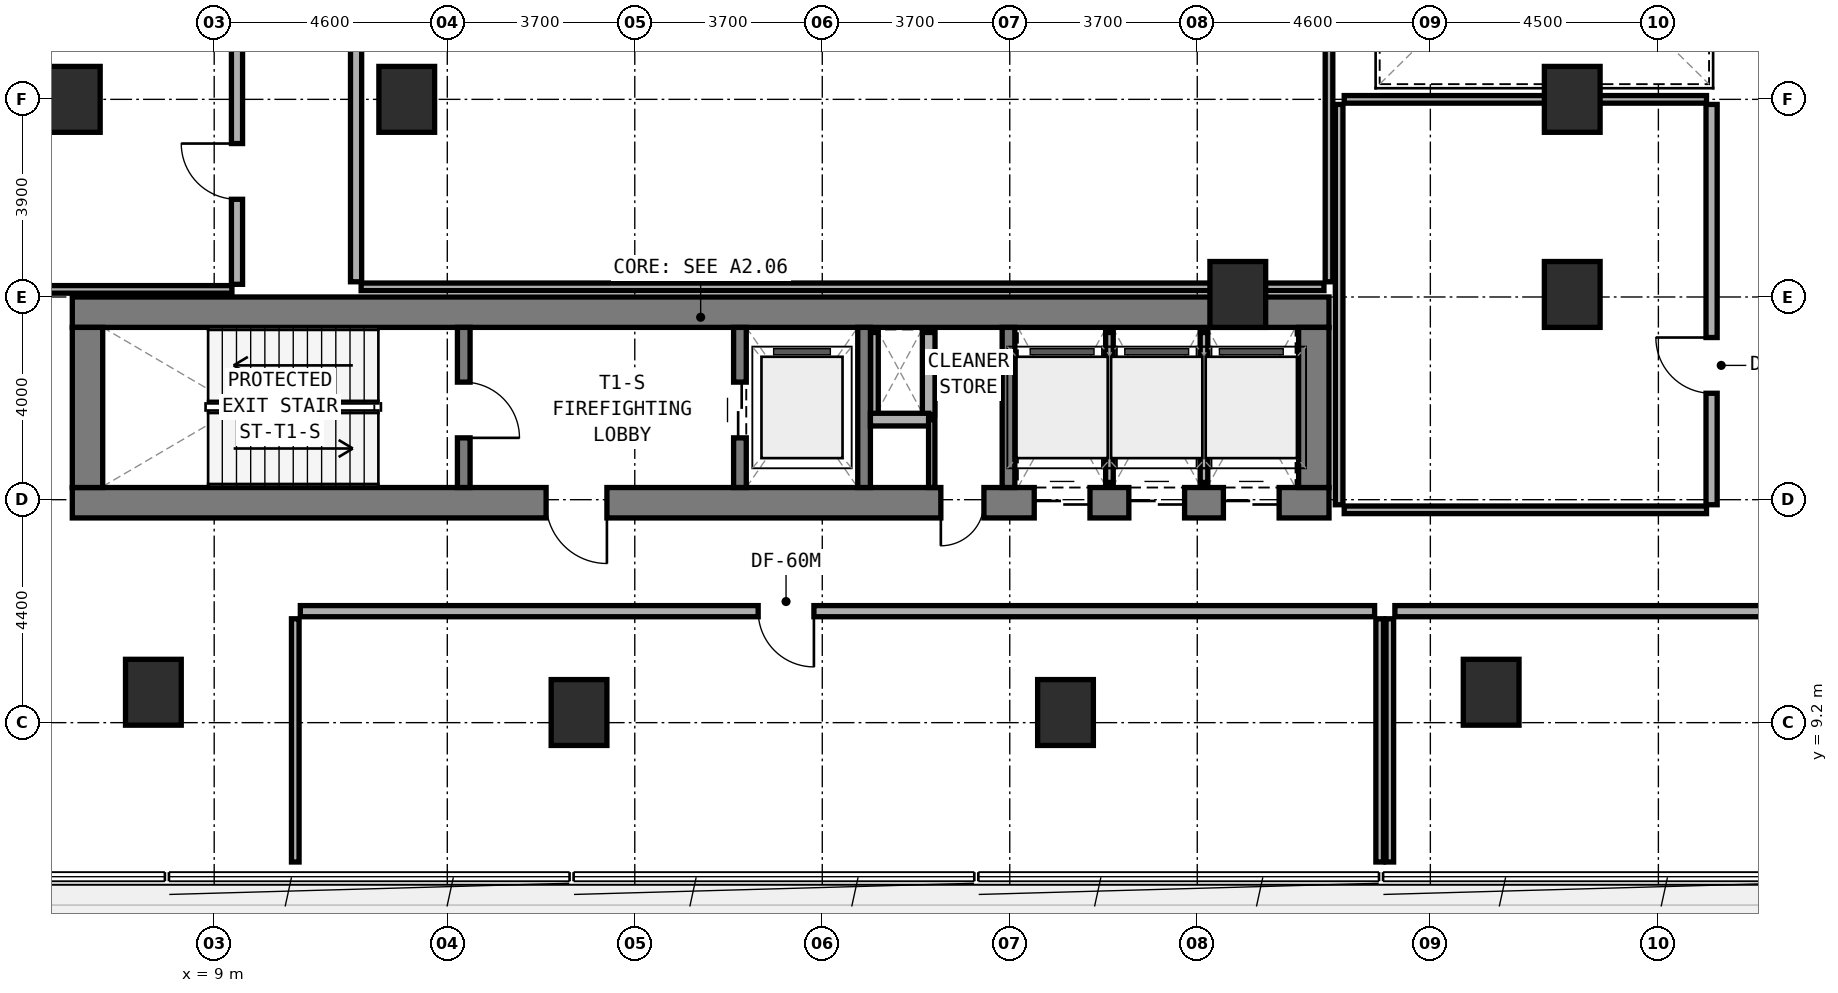
"""IFC4 building model, lengths in metres.
Left out: names, types, materials, properties, quantities, classifications, styles, units other than length and angle.
Written with IfcOpenShell. Run it as: python <this file> out.ifc"""

import sys

from ifc_helpers import new_model, si_unit, direction, frame, frame_2d, origin, origin_2d, place, context, subcontext, project, spatial, rectangle, extrude, element, fill, save


model = new_model("IFC4")
c1 = context("Model", 3, precision=1e-05, world=origin(), true_north=direction((0.0, 1.0)))
c2 = subcontext(c1, "Body", "Model", "MODEL_VIEW")
j1 = project(units=[si_unit("LENGTHUNIT", "METRE"), si_unit("PLANEANGLEUNIT", "RADIAN")], contexts=[c1])
p1 = place(None, origin())
s1 = spatial("IfcSite", under=j1, at=p1, CompositionType="ELEMENT")
p2 = place(p1, origin())
s2 = spatial("IfcBuilding", under=s1, at=p2, CompositionType="ELEMENT")
p3 = place(p2, frame((0.0, 0.0, 15.0)))
s3 = spatial("IfcBuildingStorey", under=s2, at=p3, CompositionType="ELEMENT", Elevation=15.0)
p4 = place(p3, frame((6.2, 13.54, 0.0), z_axis=(0.0, 0.0, 1.0), x_axis=(1.0, 0.0, 0.0)))
e1 = element("IfcWall", 1, at=p4, inside=s3, PredefinedType="SHEAR", context=c2, shape_type="SweptSolid", body=[
    extrude(rectangle(XDim=24.8, YDim=0.6, at=frame_2d((12.4, 0.0))), origin(), (0.0, 0.0, 1.0), 4.5),
])
p5 = place(p4, frame((9.35, 0.0, 0.0)))
e2 = element("IfcOpeningElement", 2, at=p5, cuts=e1, PredefinedType="OPENING", context=c2, shape_type="SweptSolid", body=[
    extrude(rectangle(XDim=1.2, YDim=2.15, at=frame_2d((0.6, 1.075))), frame((0.0, 0.31, 0.0), z_axis=(0.0, -1.0, 0.0), x_axis=(1.0, 0.0, 0.0)), (0.0, 0.0, 1.0), 0.62),
])
p6 = place(p4, frame((17.14, 0.0, 0.0)))
e3 = element("IfcOpeningElement", 3, at=p6, cuts=e1, PredefinedType="OPENING", context=c2, shape_type="SweptSolid", body=[
    extrude(rectangle(XDim=0.85, YDim=2.1, at=frame_2d((0.425, 1.05))), frame((0.0, 0.31, 0.0), z_axis=(0.0, -1.0, 0.0), x_axis=(1.0, 0.0, 0.0)), (0.0, 0.0, 1.0), 0.62),
])
p7 = place(p4, frame((18.983, 0.0, 0.0)))
e4 = element("IfcOpeningElement", 4, at=p7, cuts=e1, PredefinedType="OPENING", context=c2, shape_type="SweptSolid", body=[
    extrude(rectangle(XDim=1.1, YDim=2.15, at=frame_2d((0.55, 1.075))), frame((0.0, 0.31, 0.0), z_axis=(0.0, -1.0, 0.0), x_axis=(1.0, 0.0, 0.0)), (0.0, 0.0, 1.0), 0.62),
])
p8 = place(p4, frame((20.85, 0.0, 0.0)))
e5 = element("IfcOpeningElement", 5, at=p8, cuts=e1, PredefinedType="OPENING", context=c2, shape_type="SweptSolid", body=[
    extrude(rectangle(XDim=1.1, YDim=2.15, at=frame_2d((0.55, 1.075))), frame((0.0, 0.31, 0.0), z_axis=(0.0, -1.0, 0.0), x_axis=(1.0, 0.0, 0.0)), (0.0, 0.0, 1.0), 0.62),
])
p9 = place(p4, frame((22.716, 0.0, 0.0)))
e6 = element("IfcOpeningElement", 6, at=p9, cuts=e1, PredefinedType="OPENING", context=c2, shape_type="SweptSolid", body=[
    extrude(rectangle(XDim=1.1, YDim=2.15, at=frame_2d((0.55, 1.075))), frame((0.0, 0.31, 0.0), z_axis=(0.0, -1.0, 0.0), x_axis=(1.0, 0.0, 0.0)), (0.0, 0.0, 1.0), 0.62),
])
p10 = place(p3, frame((6.2, 17.3, 0.0), z_axis=(0.0, 0.0, 1.0), x_axis=(1.0, 0.0, 0.0)))
e7 = element("IfcWall", 7, at=p10, inside=s3, PredefinedType="SHEAR", context=c2, shape_type="SweptSolid", body=[
    extrude(rectangle(XDim=24.8, YDim=0.6, at=frame_2d((12.4, 0.0))), origin(), (0.0, 0.0, 1.0), 4.5),
])
for number, where, z_axis, x_axis in (
    (8, (6.5, 13.84, 0.0), (0.0, 0.0, 1.0), (0.0, 1.0, 0.0)),
    (9, (30.7, 13.84, 0.0), (0.0, 0.0, 1.0), (0.0, 1.0, 0.0)),
):
    element("IfcWall", number, at=place(p3, frame(where, z_axis=z_axis, x_axis=x_axis)), inside=s3, PredefinedType="SHEAR", context=c2, shape_type="SweptSolid", body=[
        extrude(rectangle(XDim=3.16, YDim=0.6, at=frame_2d((1.58, 0.0))), origin(), (0.0, 0.0, 1.0), 4.5),
    ])
p11 = place(p3, frame((13.925, 13.84, 0.0), z_axis=(0.0, 0.0, 1.0), x_axis=(0.0, 1.0, 0.0)))
e10 = element("IfcWall", 10, at=p11, inside=s3, PredefinedType="STANDARD", context=c2, shape_type="SweptSolid", body=[
    extrude(rectangle(XDim=3.16, YDim=0.25, at=frame_2d((1.58, 0.0))), origin(), (0.0, 0.0, 1.0), 4.1),
])
p12 = place(p11, frame((0.98, 0.0, 0.0)))
e11 = element("IfcOpeningElement", 11, at=p12, cuts=e10, PredefinedType="OPENING", context=c2, shape_type="SweptSolid", body=[
    extrude(rectangle(XDim=1.1, YDim=2.15, at=frame_2d((0.55, 1.075))), frame((0.0, 0.135, 0.0), z_axis=(0.0, -1.0, 0.0), x_axis=(1.0, 0.0, 0.0)), (0.0, 0.0, 1.0), 0.27),
])
p13 = place(p3, frame((19.375, 13.84, 0.0), z_axis=(0.0, 0.0, 1.0), x_axis=(0.0, 1.0, 0.0)))
e12 = element("IfcWall", 12, at=p13, inside=s3, PredefinedType="STANDARD", context=c2, shape_type="SweptSolid", body=[
    extrude(rectangle(XDim=3.16, YDim=0.25, at=frame_2d((1.58, 0.0))), origin(), (0.0, 0.0, 1.0), 4.1),
])
p14 = place(p13, frame((0.98, 0.0, 0.0)))
e13 = element("IfcOpeningElement", 13, at=p14, cuts=e12, PredefinedType="OPENING", context=c2, shape_type="SweptSolid", body=[
    extrude(rectangle(XDim=1.1, YDim=2.15, at=frame_2d((0.55, 1.075))), frame((0.0, 0.135, 0.0), z_axis=(0.0, -1.0, 0.0), x_axis=(1.0, 0.0, 0.0)), (0.0, 0.0, 1.0), 0.27),
])
for number, where, z_axis, x_axis in (
    (14, (21.825, 13.84, 0.0), (0.0, 0.0, 1.0), (0.0, 1.0, 0.0)),
    (15, (24.675, 13.84, 0.0), (0.0, 0.0, 1.0), (0.0, 1.0, 0.0)),
):
    element("IfcWall", number, at=place(p3, frame(where, z_axis=z_axis, x_axis=x_axis)), inside=s3, PredefinedType="STANDARD", context=c2, shape_type="SweptSolid", body=[
        extrude(rectangle(XDim=3.16, YDim=0.25, at=frame_2d((1.58, 0.0))), origin(), (0.0, 0.0, 1.0), 4.1),
    ])
for number, where, z_axis, x_axis in (
    (16, (16.2, 9.4, 0.0), (0.0, 0.0, 1.0), (1.0, 0.0, 0.0)),
    (17, (25.8, 9.4, 0.0), (0.0, 0.0, 1.0), (1.0, 0.0, 0.0)),
    (18, (6.2, 21.5, 0.0), (0.0, 0.0, 1.0), (1.0, 0.0, 0.0)),
    (19, (7.8, 9.8, 0.0), (0.0, 0.0, 1.0), (1.0, 0.0, 0.0)),
    (20, (34.2, 9.8, 0.0), (0.0, 0.0, 1.0), (1.0, 0.0, 0.0)),
    (21, (35.8, 21.5, 0.0), (0.0, 0.0, 1.0), (1.0, 0.0, 0.0)),
    (22, (35.8, 17.65, 0.0), (0.0, 0.0, 1.0), (1.0, 0.0, 0.0)),
    (23, (12.8, 21.5, 0.0), (0.0, 0.0, 1.0), (1.0, 0.0, 0.0)),
    (24, (29.2, 17.65, 0.0), (0.0, 0.0, 1.0), (1.0, 0.0, 0.0)),
):
    element("IfcColumn", number, at=place(p3, frame(where, z_axis=z_axis, x_axis=x_axis)), inside=s3, PredefinedType="COLUMN", context=c2, shape_type="SweptSolid", body=[
        extrude(rectangle(XDim=1.1, YDim=1.3, at=origin_2d()), origin(), (0.0, 0.0, 1.0), 4.5),
    ])
p15 = place(p3, frame((22.03, 15.28, 0.0), z_axis=(0.0, 0.0, 1.0), x_axis=(0.0, 1.0, 0.0)))
e25 = element("IfcWall", 25, at=p15, inside=s3, PredefinedType="PARTITIONING", context=c2, shape_type="SweptSolid", body=[
    extrude(rectangle(XDim=1.62, YDim=0.15, at=frame_2d((0.81, 0.0))), origin(), (0.0, 0.0, 1.0), 4.1),
])
p16 = place(p3, frame((23.1, 15.28, 0.0), z_axis=(0.0, 0.0, 1.0), x_axis=(0.0, 1.0, 0.0)))
e26 = element("IfcWall", 26, at=p16, inside=s3, PredefinedType="SOLIDWALL", context=c2, shape_type="SweptSolid", body=[
    extrude(rectangle(XDim=1.62, YDim=0.25, at=frame_2d((0.81, 0.0))), origin(), (0.0, 0.0, 1.0), 4.1),
])
p17 = place(p3, frame((21.95, 15.18, 0.0), z_axis=(0.0, 0.0, 1.0), x_axis=(1.0, 0.0, 0.0)))
e27 = element("IfcWall", 27, at=p17, inside=s3, PredefinedType="SOLIDWALL", context=c2, shape_type="SweptSolid", body=[
    extrude(rectangle(XDim=1.15, YDim=0.25, at=frame_2d((0.575, 0.0))), origin(), (0.0, 0.0, 1.0), 4.1),
])
p18 = place(p3, frame((23.16, 13.84, 0.0), z_axis=(0.0, 0.0, 1.0), x_axis=(0.0, 1.0, 0.0)))
e28 = element("IfcWall", 28, at=p18, inside=s3, PredefinedType="PARTITIONING", context=c2, shape_type="SweptSolid", body=[
    extrude(rectangle(XDim=1.34, YDim=0.125, at=frame_2d((0.67, 0.0))), origin(), (0.0, 0.0, 1.0), 4.1),
])
p19 = place(p3, frame((26.667, 13.94, 0.0), z_axis=(0.0, 0.0, 1.0), x_axis=(0.0, 1.0, 0.0)))
e29 = element("IfcWall", 29, at=p19, inside=s3, PredefinedType="PARTITIONING", context=c2, shape_type="SweptSolid", body=[
    extrude(rectangle(XDim=2.96, YDim=0.15, at=frame_2d((1.48, 0.0))), origin(), (0.0, 0.0, 1.0), 4.1),
])
p20 = place(p3, frame((28.533, 13.94, 0.0), z_axis=(0.0, 0.0, 1.0), x_axis=(0.0, 1.0, 0.0)))
e30 = element("IfcWall", 30, at=p20, inside=s3, PredefinedType="PARTITIONING", context=c2, shape_type="SweptSolid", body=[
    extrude(rectangle(XDim=2.96, YDim=0.15, at=frame_2d((1.48, 0.0))), origin(), (0.0, 0.0, 1.0), 3.175),
])
p21 = place(p3, frame((31.0, 17.9, 0.0), z_axis=(0.0, 0.0, 1.0), x_axis=(0.0, 1.0, 0.0)))
e31 = element("IfcWall", 31, at=p21, inside=s3, PredefinedType="PARTITIONING", context=c2, shape_type="SweptSolid", body=[
    extrude(rectangle(XDim=14.2, YDim=0.15, at=frame_2d((7.1, 0.0))), origin(), (0.0, 0.0, 1.0), 3.175),
])
p22 = place(p3, frame((11.9, 17.8, 0.0), z_axis=(0.0, 0.0, 1.0), x_axis=(1.0, 0.0, 0.0)))
e32 = element("IfcWall", 32, at=p22, inside=s3, PredefinedType="PARTITIONING", context=c2, shape_type="SweptSolid", body=[
    extrude(rectangle(XDim=19.0, YDim=0.15, at=frame_2d((9.5, 0.0))), origin(), (0.0, 0.0, 1.0), 3.175),
])
p23 = place(p3, frame((11.8, 17.9, 0.0), z_axis=(0.0, 0.0, 1.0), x_axis=(0.0, 1.0, 0.0)))
e33 = element("IfcWall", 33, at=p23, inside=s3, PredefinedType="SOLIDWALL", context=c2, shape_type="SweptSolid", body=[
    extrude(rectangle(XDim=14.2, YDim=0.22, at=frame_2d((7.1, 0.0))), origin(), (0.0, 0.0, 1.0), 3.175),
])
p24 = place(p23, frame((5.885, 0.0, 0.0)))
e34 = element("IfcOpeningElement", 34, at=p24, cuts=e33, PredefinedType="OPENING", context=c2, shape_type="SweptSolid", body=[
    extrude(rectangle(XDim=1.1, YDim=2.1, at=frame_2d((0.55, 1.05))), frame((0.0, 0.12, 0.0), z_axis=(0.0, -1.0, 0.0), x_axis=(1.0, 0.0, 0.0)), (0.0, 0.0, 1.0), 0.24),
])
p25 = place(p3, frame((31.2, 13.5, 0.0), z_axis=(0.0, 0.0, 1.0), x_axis=(0.0, 1.0, 0.0)))
e35 = element("IfcWall", 35, at=p25, inside=s3, PredefinedType="PARTITIONING", context=c2, shape_type="SweptSolid", body=[
    extrude(rectangle(XDim=7.9, YDim=0.15, at=frame_2d((3.95, 0.0))), origin(), (0.0, 0.0, 1.0), 3.175),
])
p26 = place(p3, frame((31.3, 13.4, 0.0), z_axis=(0.0, 0.0, 1.0), x_axis=(1.0, 0.0, 0.0)))
e36 = element("IfcWall", 36, at=p26, inside=s3, PredefinedType="PARTITIONING", context=c2, shape_type="SweptSolid", body=[
    extrude(rectangle(XDim=7.15, YDim=0.15, at=frame_2d((3.575, 0.0))), origin(), (0.0, 0.0, 1.0), 3.625),
])
p27 = place(p3, frame((31.3, 21.5, 0.0), z_axis=(0.0, 0.0, 1.0), x_axis=(1.0, 0.0, 0.0)))
e37 = element("IfcWall", 37, at=p27, inside=s3, PredefinedType="PARTITIONING", context=c2, shape_type="SweptSolid", body=[
    extrude(rectangle(XDim=7.15, YDim=0.15, at=frame_2d((3.575, 0.0))), origin(), (0.0, 0.0, 1.0), 3.175),
])
p28 = place(p3, frame((38.55, 13.5, 0.0), z_axis=(0.0, 0.0, 1.0), x_axis=(0.0, 1.0, 0.0)))
e38 = element("IfcWall", 38, at=p28, inside=s3, PredefinedType="SOLIDWALL", context=c2, shape_type="SweptSolid", body=[
    extrude(rectangle(XDim=7.9, YDim=0.22, at=frame_2d((3.95, 0.0))), origin(), (0.0, 0.0, 1.0), 3.175),
])
p29 = place(p28, frame((2.2, 0.0, 0.0)))
e39 = element("IfcOpeningElement", 39, at=p29, cuts=e38, PredefinedType="OPENING", context=c2, shape_type="SweptSolid", body=[
    extrude(rectangle(XDim=1.1, YDim=2.1, at=frame_2d((0.55, 1.05))), frame((0.0, 0.12, 0.0), z_axis=(0.0, -1.0, 0.0), x_axis=(1.0, 0.0, 0.0)), (0.0, 0.0, 1.0), 0.24),
])
for number, where, z_axis, x_axis in (
    (40, (10.6, 6.45, 0.0), (0.0, 0.0, 1.0), (0.0, 1.0, 0.0)),
    (41, (32.0, 6.45, 0.0), (0.0, 0.0, 1.0), (0.0, 1.0, 0.0)),
):
    element("IfcWall", number, at=place(p3, frame(where, z_axis=z_axis, x_axis=x_axis)), inside=s3, PredefinedType="PARTITIONING", context=c2, shape_type="SweptSolid", body=[
        extrude(rectangle(XDim=4.8, YDim=0.15, at=frame_2d((2.4, 0.0))), origin(), (0.0, 0.0, 1.0), 3.625),
    ])
p30 = place(p3, frame((10.7, 11.4, 0.0), z_axis=(0.0, 0.0, 1.0), x_axis=(1.0, 0.0, 0.0)))
e42 = element("IfcWall", 42, at=p30, inside=s3, PredefinedType="SOLIDWALL", context=c2, shape_type="SweptSolid", body=[
    extrude(rectangle(XDim=21.2, YDim=0.22, at=frame_2d((10.6, 0.0))), origin(), (0.0, 0.0, 1.0), 3.175),
])
p31 = place(p30, frame((9.035, 0.0, 0.0)))
e43 = element("IfcOpeningElement", 43, at=p31, cuts=e42, PredefinedType="OPENING", context=c2, shape_type="SweptSolid", body=[
    extrude(rectangle(XDim=1.1, YDim=2.1, at=frame_2d((0.55, 1.05))), frame((0.0, 0.12, 0.0), z_axis=(0.0, -1.0, 0.0), x_axis=(1.0, 0.0, 0.0)), (0.0, 0.0, 1.0), 0.24),
])
p32 = place(p3, frame((32.2, 6.45, 0.0), z_axis=(0.0, 0.0, 1.0), x_axis=(0.0, 1.0, 0.0)))
e44 = element("IfcWall", 44, at=p32, inside=s3, PredefinedType="PARTITIONING", context=c2, shape_type="SweptSolid", body=[
    extrude(rectangle(XDim=4.8, YDim=0.15, at=frame_2d((2.4, 0.0))), origin(), (0.0, 0.0, 1.0), 3.625),
])
p33 = place(p3, frame((32.3, 11.4, 0.0), z_axis=(0.0, 0.0, 1.0), x_axis=(1.0, 0.0, 0.0)))
e45 = element("IfcWall", 45, at=p33, inside=s3, PredefinedType="SOLIDWALL", context=c2, shape_type="SweptSolid", body=[
    extrude(rectangle(XDim=25.1, YDim=0.22, at=frame_2d((12.55, 0.0))), origin(), (0.0, 0.0, 1.0), 3.375),
])
p34 = place(p33, frame((10.79, 0.0, 0.0)))
e46 = element("IfcOpeningElement", 46, at=p34, cuts=e45, PredefinedType="OPENING", context=c2, shape_type="SweptSolid", body=[
    extrude(rectangle(XDim=1.1, YDim=2.1, at=frame_2d((0.55, 1.05))), frame((0.0, 0.12, 0.0), z_axis=(0.0, -1.0, 0.0), x_axis=(1.0, 0.0, 0.0)), (0.0, 0.0, 1.0), 0.24),
])
p35 = place(p3, frame((0.45, 17.75, 0.0), z_axis=(0.0, 0.0, 1.0), x_axis=(1.0, 0.0, 0.0)))
e47 = element("IfcWall", 47, at=p35, inside=s3, PredefinedType="PARTITIONING", context=c2, shape_type="SweptSolid", body=[
    extrude(rectangle(XDim=8.9, YDim=0.15, at=frame_2d((4.45, 0.0))), origin(), (0.0, 0.0, 1.0), 3.375),
])
p36 = place(p3, frame((9.45, 17.85, 0.0), z_axis=(0.0, 0.0, 1.0), x_axis=(0.0, 1.0, 0.0)))
e48 = element("IfcWall", 48, at=p36, inside=s3, PredefinedType="SOLIDWALL", context=c2, shape_type="SweptSolid", body=[
    extrude(rectangle(XDim=4.85, YDim=0.22, at=frame_2d((2.425, 0.0))), origin(), (0.0, 0.0, 1.0), 3.175),
])
p37 = place(p36, frame((1.678, 0.0, 0.0)))
e49 = element("IfcOpeningElement", 49, at=p37, cuts=e48, PredefinedType="OPENING", context=c2, shape_type="SweptSolid", body=[
    extrude(rectangle(XDim=1.1, YDim=2.1, at=frame_2d((0.55, 1.05))), frame((0.0, 0.12, 0.0), z_axis=(0.0, -1.0, 0.0), x_axis=(1.0, 0.0, 0.0)), (0.0, 0.0, 1.0), 0.24),
])
p38 = place(p12, frame((1.1, 0.0, 0.0), z_axis=(0.0, 0.0, 1.0), x_axis=(-1.0, 0.0, 0.0)))
e50 = element("IfcDoor", 50, at=p38, inside=s3, OperationType="SINGLE_SWING_RIGHT", PredefinedType="DOOR", context=c2, shape_type="SweptSolid", body=[
    extrude(rectangle(XDim=1.1, YDim=2.15, at=frame_2d((0.55, 1.075))), frame((0.0, 0.025, 0.0), z_axis=(0.0, -1.0, 0.0), x_axis=(1.0, 0.0, 0.0)), (0.0, 0.0, 1.0), 0.05),
])
fill(e11, e50)
p39 = place(p5, frame((1.2, 0.0, 0.0), z_axis=(0.0, 0.0, 1.0), x_axis=(-1.0, 0.0, 0.0)))
e51 = element("IfcDoor", 51, at=p39, inside=s3, OperationType="SINGLE_SWING_LEFT", PredefinedType="DOOR", context=c2, shape_type="SweptSolid", body=[
    extrude(rectangle(XDim=1.2, YDim=2.15, at=frame_2d((0.6, 1.075))), frame((0.0, 0.025, 0.0), z_axis=(0.0, -1.0, 0.0), x_axis=(1.0, 0.0, 0.0)), (0.0, 0.0, 1.0), 0.05),
])
fill(e2, e51)
p40 = place(p14, origin())
e52 = element("IfcDoor", 52, at=p40, inside=s3, OperationType="DOUBLE_DOOR_SLIDING", PredefinedType="DOOR", context=c2, shape_type="SweptSolid", body=[
    extrude(rectangle(XDim=1.1, YDim=2.15, at=frame_2d((0.55, 1.075))), frame((0.0, 0.025, 0.0), z_axis=(0.0, -1.0, 0.0), x_axis=(1.0, 0.0, 0.0)), (0.0, 0.0, 1.0), 0.05),
])
fill(e13, e52)
p41 = place(p6, frame((0.85, 0.0, 0.0), z_axis=(0.0, 0.0, 1.0), x_axis=(-1.0, 0.0, 0.0)))
e53 = element("IfcDoor", 53, at=p41, inside=s3, OperationType="SINGLE_SWING_RIGHT", PredefinedType="DOOR", context=c2, shape_type="SweptSolid", body=[
    extrude(rectangle(XDim=0.85, YDim=2.1, at=frame_2d((0.425, 1.05))), frame((0.0, 0.025, 0.0), z_axis=(0.0, -1.0, 0.0), x_axis=(1.0, 0.0, 0.0)), (0.0, 0.0, 1.0), 0.05),
])
fill(e3, e53)
p42 = place(p7, frame((1.1, 0.0, 0.0), z_axis=(0.0, 0.0, 1.0), x_axis=(-1.0, 0.0, 0.0)))
e54 = element("IfcDoor", 54, at=p42, inside=s3, OperationType="DOUBLE_DOOR_SLIDING", PredefinedType="DOOR", context=c2, shape_type="SweptSolid", body=[
    extrude(rectangle(XDim=1.1, YDim=2.15, at=frame_2d((0.55, 1.075))), frame((0.0, 0.025, 0.0), z_axis=(0.0, -1.0, 0.0), x_axis=(1.0, 0.0, 0.0)), (0.0, 0.0, 1.0), 0.05),
])
fill(e4, e54)
p43 = place(p8, frame((1.1, 0.0, 0.0), z_axis=(0.0, 0.0, 1.0), x_axis=(-1.0, 0.0, 0.0)))
e55 = element("IfcDoor", 55, at=p43, inside=s3, OperationType="DOUBLE_DOOR_SLIDING", PredefinedType="DOOR", context=c2, shape_type="SweptSolid", body=[
    extrude(rectangle(XDim=1.1, YDim=2.15, at=frame_2d((0.55, 1.075))), frame((0.0, 0.025, 0.0), z_axis=(0.0, -1.0, 0.0), x_axis=(1.0, 0.0, 0.0)), (0.0, 0.0, 1.0), 0.05),
])
fill(e5, e55)
p44 = place(p9, frame((1.1, 0.0, 0.0), z_axis=(0.0, 0.0, 1.0), x_axis=(-1.0, 0.0, 0.0)))
e56 = element("IfcDoor", 56, at=p44, inside=s3, OperationType="DOUBLE_DOOR_SLIDING", PredefinedType="DOOR", context=c2, shape_type="SweptSolid", body=[
    extrude(rectangle(XDim=1.1, YDim=2.15, at=frame_2d((0.55, 1.075))), frame((0.0, 0.025, 0.0), z_axis=(0.0, -1.0, 0.0), x_axis=(1.0, 0.0, 0.0)), (0.0, 0.0, 1.0), 0.05),
])
fill(e6, e56)
p45 = place(p29, origin())
e57 = element("IfcDoor", 57, at=p45, inside=s3, OperationType="SINGLE_SWING_RIGHT", PredefinedType="DOOR", context=c2, shape_type="SweptSolid", body=[
    extrude(rectangle(XDim=1.1, YDim=2.1, at=frame_2d((0.55, 1.05))), frame((0.0, 0.025, 0.0), z_axis=(0.0, -1.0, 0.0), x_axis=(1.0, 0.0, 0.0)), (0.0, 0.0, 1.0), 0.05),
])
fill(e39, e57)
p46 = place(p31, frame((1.1, 0.0, 0.0), z_axis=(0.0, 0.0, 1.0), x_axis=(-1.0, 0.0, 0.0)))
e58 = element("IfcDoor", 58, at=p46, inside=s3, OperationType="SINGLE_SWING_LEFT", PredefinedType="DOOR", context=c2, shape_type="SweptSolid", body=[
    extrude(rectangle(XDim=1.1, YDim=2.1, at=frame_2d((0.55, 1.05))), frame((0.0, 0.025, 0.0), z_axis=(0.0, -1.0, 0.0), x_axis=(1.0, 0.0, 0.0)), (0.0, 0.0, 1.0), 0.05),
])
fill(e43, e58)
p47 = place(p37, origin())
e59 = element("IfcDoor", 59, at=p47, inside=s3, OperationType="SINGLE_SWING_RIGHT", PredefinedType="DOOR", context=c2, shape_type="SweptSolid", body=[
    extrude(rectangle(XDim=1.1, YDim=2.1, at=frame_2d((0.55, 1.05))), frame((0.0, 0.025, 0.0), z_axis=(0.0, -1.0, 0.0), x_axis=(1.0, 0.0, 0.0)), (0.0, 0.0, 1.0), 0.05),
])
fill(e49, e59)
save(model, sys.argv[1])
